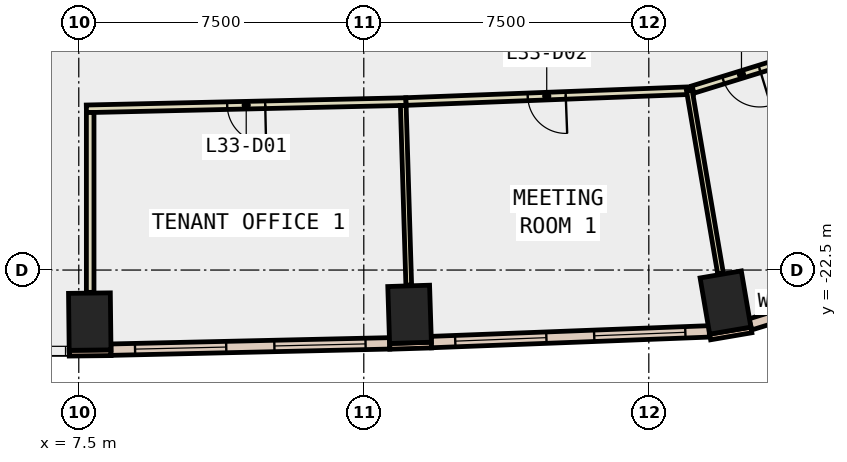
"""IFC4 building model, lengths in metres.
Left out: names, types, materials, properties, quantities, classifications, styles, units other than length and angle.
Written with IfcOpenShell. Run it as: python <this file> out.ifc"""

import sys

from ifc_helpers import new_model, si_unit, direction, frame, frame_2d, origin, origin_2d, place, context, subcontext, project, spatial, rectangle, extrude, element, fill, save


model = new_model("IFC4")
c1 = context("Model", 3, precision=1e-05, world=origin(), true_north=direction((0.0, 1.0)))
c2 = subcontext(c1, "Body", "Model", "MODEL_VIEW")
j1 = project(units=[si_unit("LENGTHUNIT", "METRE"), si_unit("PLANEANGLEUNIT", "RADIAN")], contexts=[c1])
p1 = place(None, origin())
s1 = spatial("IfcSite", under=j1, at=p1, CompositionType="ELEMENT")
p2 = place(p1, origin())
s2 = spatial("IfcBuilding", under=s1, at=p2, CompositionType="ELEMENT")
p3 = place(p2, frame((0.0, 0.0, 150.8)))
s3 = spatial("IfcBuildingStorey", under=s2, at=p3, CompositionType="ELEMENT", Elevation=150.8)
for number, where, z_axis, x_axis in (
    (1, (7.789, -23.857, -0.4), (0.0, 0.0, 1.0), (1.0, 0.012, 0.0)),
    (2, (16.205, -23.666, -0.4), (0.0, 0.0, 1.0), (0.999, 0.032, 0.0)),
    (3, (24.518, -23.355, -0.4), (0.0, 0.0, 1.0), (0.986, 0.168, 0.0)),
):
    element("IfcColumn", number, at=place(p3, frame(where, z_axis=z_axis, x_axis=x_axis)), inside=s3, PredefinedType="COLUMN", context=c2, shape_type="SweptSolid", body=[
        extrude(rectangle(XDim=1.1, YDim=1.5, at=origin_2d()), origin(), (0.0, 0.0, 1.0), 4.2),
    ])
p4 = place(p3, frame((7.249, -24.688, 0.0), z_axis=(0.0, 0.0, 1.0), x_axis=(0.999940879068, 0.010873746799, 0.0)))
e4 = element("IfcWall", 4, at=p4, inside=s3, PredefinedType="STANDARD", context=c2, shape_type="SweptSolid", body=[
    extrude(rectangle(XDim=1.1, YDim=0.15, at=frame_2d((0.55, 0.0))), origin(), (0.0, 0.0, 1.0), 3.8),
])
p5 = place(p3, frame((15.682, -24.508, 0.0), z_axis=(0.0, 0.0, 1.0), x_axis=(0.999523702549, 0.030860460829, 0.0)))
e5 = element("IfcWall", 5, at=p5, inside=s3, PredefinedType="STANDARD", context=c2, shape_type="SweptSolid", body=[
    extrude(rectangle(XDim=1.1, YDim=0.15, at=frame_2d((0.55, 0.0))), origin(), (0.0, 0.0, 1.0), 3.8),
])
p6 = place(p3, frame((24.114, -24.261, 0.0), z_axis=(0.0, 0.0, 1.0), x_axis=(0.985763338892, 0.168138751323, 0.0)))
e6 = element("IfcWall", 6, at=p6, inside=s3, PredefinedType="STANDARD", context=c2, shape_type="SweptSolid", body=[
    extrude(rectangle(XDim=1.101, YDim=0.15, at=frame_2d((0.55, 0.0))), origin(), (0.0, 0.0, 1.0), 3.8),
])
p7 = place(p3, frame((8.347, -24.595, 0.0), z_axis=(0.0, 0.0, 1.0), x_axis=(0.999743825009, 0.022633699594, 0.0)))
e7 = element("IfcWall", 7, at=p7, inside=s3, PredefinedType="STANDARD", context=c2, shape_type="SweptSolid", body=[
    extrude(rectangle(XDim=7.335, YDim=0.3, at=frame_2d((3.667, 0.0))), origin(), (0.0, 0.0, 1.0), 3.8),
])
p8 = place(p7, frame((0.634, 0.0, 0.9)))
e8 = element("IfcOpeningElement", 8, at=p8, cuts=e7, PredefinedType="OPENING", context=c2, shape_type="SweptSolid", body=[
    extrude(rectangle(XDim=2.4, YDim=2.6, at=frame_2d((1.2, 1.3))), frame((0.0, 0.16, 0.0), z_axis=(0.0, -1.0, 0.0), x_axis=(1.0, 0.0, 0.0)), (0.0, 0.0, 1.0), 0.32),
])
p9 = place(p7, frame((4.301, 0.0, 0.9)))
e9 = element("IfcOpeningElement", 9, at=p9, cuts=e7, PredefinedType="OPENING", context=c2, shape_type="SweptSolid", body=[
    extrude(rectangle(XDim=2.4, YDim=2.6, at=frame_2d((1.2, 1.3))), frame((0.0, 0.16, 0.0), z_axis=(0.0, -1.0, 0.0), x_axis=(1.0, 0.0, 0.0)), (0.0, 0.0, 1.0), 0.32),
])
p10 = place(p3, frame((16.778, -24.395, 0.0), z_axis=(0.0, 0.0, 1.0), x_axis=(0.999262356942, 0.038402369711, 0.0)))
e10 = element("IfcWall", 10, at=p10, inside=s3, PredefinedType="STANDARD", context=c2, shape_type="SweptSolid", body=[
    extrude(rectangle(XDim=7.317, YDim=0.3, at=frame_2d((3.659, 0.0))), origin(), (0.0, 0.0, 1.0), 3.8),
])
p11 = place(p10, frame((0.629, 0.0, 0.9)))
e11 = element("IfcOpeningElement", 11, at=p11, cuts=e10, PredefinedType="OPENING", context=c2, shape_type="SweptSolid", body=[
    extrude(rectangle(XDim=2.4, YDim=2.6, at=frame_2d((1.2, 1.3))), frame((0.0, 0.16, 0.0), z_axis=(0.0, -1.0, 0.0), x_axis=(1.0, 0.0, 0.0)), (0.0, 0.0, 1.0), 0.32),
])
p12 = place(p10, frame((4.288, 0.0, 0.9)))
e12 = element("IfcOpeningElement", 12, at=p12, cuts=e10, PredefinedType="OPENING", context=c2, shape_type="SweptSolid", body=[
    extrude(rectangle(XDim=2.4, YDim=2.6, at=frame_2d((1.2, 1.3))), frame((0.0, 0.16, 0.0), z_axis=(0.0, -1.0, 0.0), x_axis=(1.0, 0.0, 0.0)), (0.0, 0.0, 1.0), 0.32),
])
p13 = place(p3, frame((25.173, -23.93, 0.0), z_axis=(0.0, 0.0, 1.0), x_axis=(0.955473661147, 0.295076401723, 0.0)))
e13 = element("IfcWall", 13, at=p13, inside=s3, PredefinedType="STANDARD", context=c2, shape_type="SweptSolid", body=[
    extrude(rectangle(XDim=3.931, YDim=0.3, at=frame_2d((1.965, 0.0))), origin(), (0.0, 0.0, 1.0), 3.8),
])
p14 = place(p13, frame((1.266, 0.0, 0.9)))
e14 = element("IfcOpeningElement", 14, at=p14, cuts=e13, PredefinedType="OPENING", context=c2, shape_type="SweptSolid", body=[
    extrude(rectangle(XDim=1.4, YDim=2.6, at=frame_2d((0.7, 1.3))), frame((0.0, 0.16, 0.0), z_axis=(0.0, -1.0, 0.0), x_axis=(1.0, 0.0, 0.0)), (0.0, 0.0, 1.0), 0.32),
])
p15 = place(p3, frame((16.111, -18.067, 0.0), z_axis=(0.0, 0.0, 1.0), x_axis=(-0.999741835545, -0.022721405353, 0.0)))
e15 = element("IfcWall", 15, at=p15, inside=s3, PredefinedType="PARTITIONING", context=c2, shape_type="SweptSolid", body=[
    extrude(rectangle(XDim=8.413, YDim=0.2, at=frame_2d((4.207, 0.0))), origin(), (0.0, 0.0, 1.0), 3.8),
])
p16 = place(p15, frame((3.706, 0.0, 0.0)))
e16 = element("IfcOpeningElement", 16, at=p16, cuts=e15, PredefinedType="OPENING", context=c2, shape_type="SweptSolid", body=[
    extrude(rectangle(XDim=1.0, YDim=2.1, at=frame_2d((0.5, 1.05))), frame((0.0, 0.11, 0.0), z_axis=(0.0, -1.0, 0.0), x_axis=(1.0, 0.0, 0.0)), (0.0, 0.0, 1.0), 0.22),
])
p17 = place(p3, frame((23.667, -17.776, 0.0), z_axis=(0.0, 0.0, 1.0), x_axis=(-0.999264080977, -0.038357482575, 0.0)))
e17 = element("IfcWall", 17, at=p17, inside=s3, PredefinedType="PARTITIONING", context=c2, shape_type="SweptSolid", body=[
    extrude(rectangle(XDim=7.562, YDim=0.2, at=frame_2d((3.781, 0.0))), origin(), (0.0, 0.0, 1.0), 3.8),
])
p18 = place(p17, frame((3.356, 0.0, 0.0)))
e18 = element("IfcOpeningElement", 18, at=p18, cuts=e17, PredefinedType="OPENING", context=c2, shape_type="SweptSolid", body=[
    extrude(rectangle(XDim=1.0, YDim=2.1, at=frame_2d((0.5, 1.05))), frame((0.0, 0.11, 0.0), z_axis=(0.0, -1.0, 0.0), x_axis=(1.0, 0.0, 0.0)), (0.0, 0.0, 1.0), 0.22),
])
p19 = place(p3, frame((26.213, -16.963, 0.0), z_axis=(0.0, 0.0, 1.0), x_axis=(-0.955509582123, -0.294960062501, 0.0)))
e19 = element("IfcWall", 19, at=p19, inside=s3, PredefinedType="PARTITIONING", context=c2, shape_type="SweptSolid", body=[
    extrude(rectangle(XDim=2.668, YDim=0.2, at=frame_2d((1.334, 0.0))), origin(), (0.0, 0.0, 1.0), 3.8),
])
p20 = place(p19, frame((0.834, 0.0, 0.0)))
e20 = element("IfcOpeningElement", 20, at=p20, cuts=e19, PredefinedType="OPENING", context=c2, shape_type="SweptSolid", body=[
    extrude(rectangle(XDim=1.0, YDim=2.1, at=frame_2d((0.5, 1.05))), frame((0.0, 0.11, 0.0), z_axis=(0.0, -1.0, 0.0), x_axis=(1.0, 0.0, 0.0)), (0.0, 0.0, 1.0), 0.22),
])
p21 = place(p3, frame((7.8, -18.355, 0.0), z_axis=(0.0, 0.0, 1.0), x_axis=(0.0, -1.0, 0.0)))
e21 = element("IfcWall", 21, at=p21, inside=s3, PredefinedType="PARTITIONING", context=c2, shape_type="SweptSolid", body=[
    extrude(rectangle(XDim=4.732, YDim=0.2, at=frame_2d((2.366, 0.0))), origin(), (0.0, 0.0, 1.0), 3.8),
])
p22 = place(p3, frame((16.039, -18.169, 0.0), z_axis=(0.0, 0.0, 1.0), x_axis=(0.030457921157, -0.999536049895, 0.0)))
e22 = element("IfcWall", 22, at=p22, inside=s3, PredefinedType="PARTITIONING", context=c2, shape_type="SweptSolid", body=[
    extrude(rectangle(XDim=4.729, YDim=0.15, at=frame_2d((2.365, 0.0))), origin(), (0.0, 0.0, 1.0), 3.8),
])
p23 = place(p3, frame((23.567, -17.779, 0.0), z_axis=(0.0, 0.0, 1.0), x_axis=(0.168027663896, -0.985782280306, 0.0)))
e23 = element("IfcWall", 23, at=p23, inside=s3, PredefinedType="PARTITIONING", context=c2, shape_type="SweptSolid", body=[
    extrude(rectangle(XDim=4.886, YDim=0.15, at=frame_2d((2.443, 0.0))), origin(), (0.0, 0.0, 1.0), 3.8),
])
p24 = place(p8, origin())
e24 = element("IfcWindow", 24, at=p24, inside=s3, PartitioningType="SINGLE_PANEL", PredefinedType="WINDOW", context=c2, shape_type="SweptSolid", body=[
    extrude(rectangle(XDim=2.4, YDim=2.6, at=frame_2d((1.2, 1.3))), frame((0.0, 0.03, 0.0), z_axis=(0.0, -1.0, 0.0), x_axis=(1.0, 0.0, 0.0)), (0.0, 0.0, 1.0), 0.06),
])
fill(e8, e24)
p25 = place(p9, origin())
e25 = element("IfcWindow", 25, at=p25, inside=s3, PartitioningType="SINGLE_PANEL", PredefinedType="WINDOW", context=c2, shape_type="SweptSolid", body=[
    extrude(rectangle(XDim=2.4, YDim=2.6, at=frame_2d((1.2, 1.3))), frame((0.0, 0.03, 0.0), z_axis=(0.0, -1.0, 0.0), x_axis=(1.0, 0.0, 0.0)), (0.0, 0.0, 1.0), 0.06),
])
fill(e9, e25)
p26 = place(p11, origin())
e26 = element("IfcWindow", 26, at=p26, inside=s3, PartitioningType="SINGLE_PANEL", PredefinedType="WINDOW", context=c2, shape_type="SweptSolid", body=[
    extrude(rectangle(XDim=2.4, YDim=2.6, at=frame_2d((1.2, 1.3))), frame((0.0, 0.03, 0.0), z_axis=(0.0, -1.0, 0.0), x_axis=(1.0, 0.0, 0.0)), (0.0, 0.0, 1.0), 0.06),
])
fill(e11, e26)
p27 = place(p12, origin())
e27 = element("IfcWindow", 27, at=p27, inside=s3, PartitioningType="SINGLE_PANEL", PredefinedType="WINDOW", context=c2, shape_type="SweptSolid", body=[
    extrude(rectangle(XDim=2.4, YDim=2.6, at=frame_2d((1.2, 1.3))), frame((0.0, 0.03, 0.0), z_axis=(0.0, -1.0, 0.0), x_axis=(1.0, 0.0, 0.0)), (0.0, 0.0, 1.0), 0.06),
])
fill(e12, e27)
p28 = place(p16, origin())
e28 = element("IfcDoor", 28, at=p28, inside=s3, OperationType="SINGLE_SWING_RIGHT", PredefinedType="DOOR", context=c2, shape_type="SweptSolid", body=[
    extrude(rectangle(XDim=1.0, YDim=2.1, at=frame_2d((0.5, 1.05))), frame((0.0, 0.025, 0.0), z_axis=(0.0, -1.0, 0.0), x_axis=(1.0, 0.0, 0.0)), (0.0, 0.0, 1.0), 0.05),
])
fill(e16, e28)
p29 = place(p18, origin())
e29 = element("IfcDoor", 29, at=p29, inside=s3, OperationType="SINGLE_SWING_LEFT", PredefinedType="DOOR", context=c2, shape_type="SweptSolid", body=[
    extrude(rectangle(XDim=1.0, YDim=2.1, at=frame_2d((0.5, 1.05))), frame((0.0, 0.025, 0.0), z_axis=(0.0, -1.0, 0.0), x_axis=(1.0, 0.0, 0.0)), (0.0, 0.0, 1.0), 0.05),
])
fill(e18, e29)
p30 = place(p20, origin())
e30 = element("IfcDoor", 30, at=p30, inside=s3, OperationType="SINGLE_SWING_LEFT", PredefinedType="DOOR", context=c2, shape_type="SweptSolid", body=[
    extrude(rectangle(XDim=1.0, YDim=2.1, at=frame_2d((0.5, 1.05))), frame((0.0, 0.025, 0.0), z_axis=(0.0, -1.0, 0.0), x_axis=(1.0, 0.0, 0.0)), (0.0, 0.0, 1.0), 0.05),
])
fill(e20, e30)
save(model, sys.argv[1])
